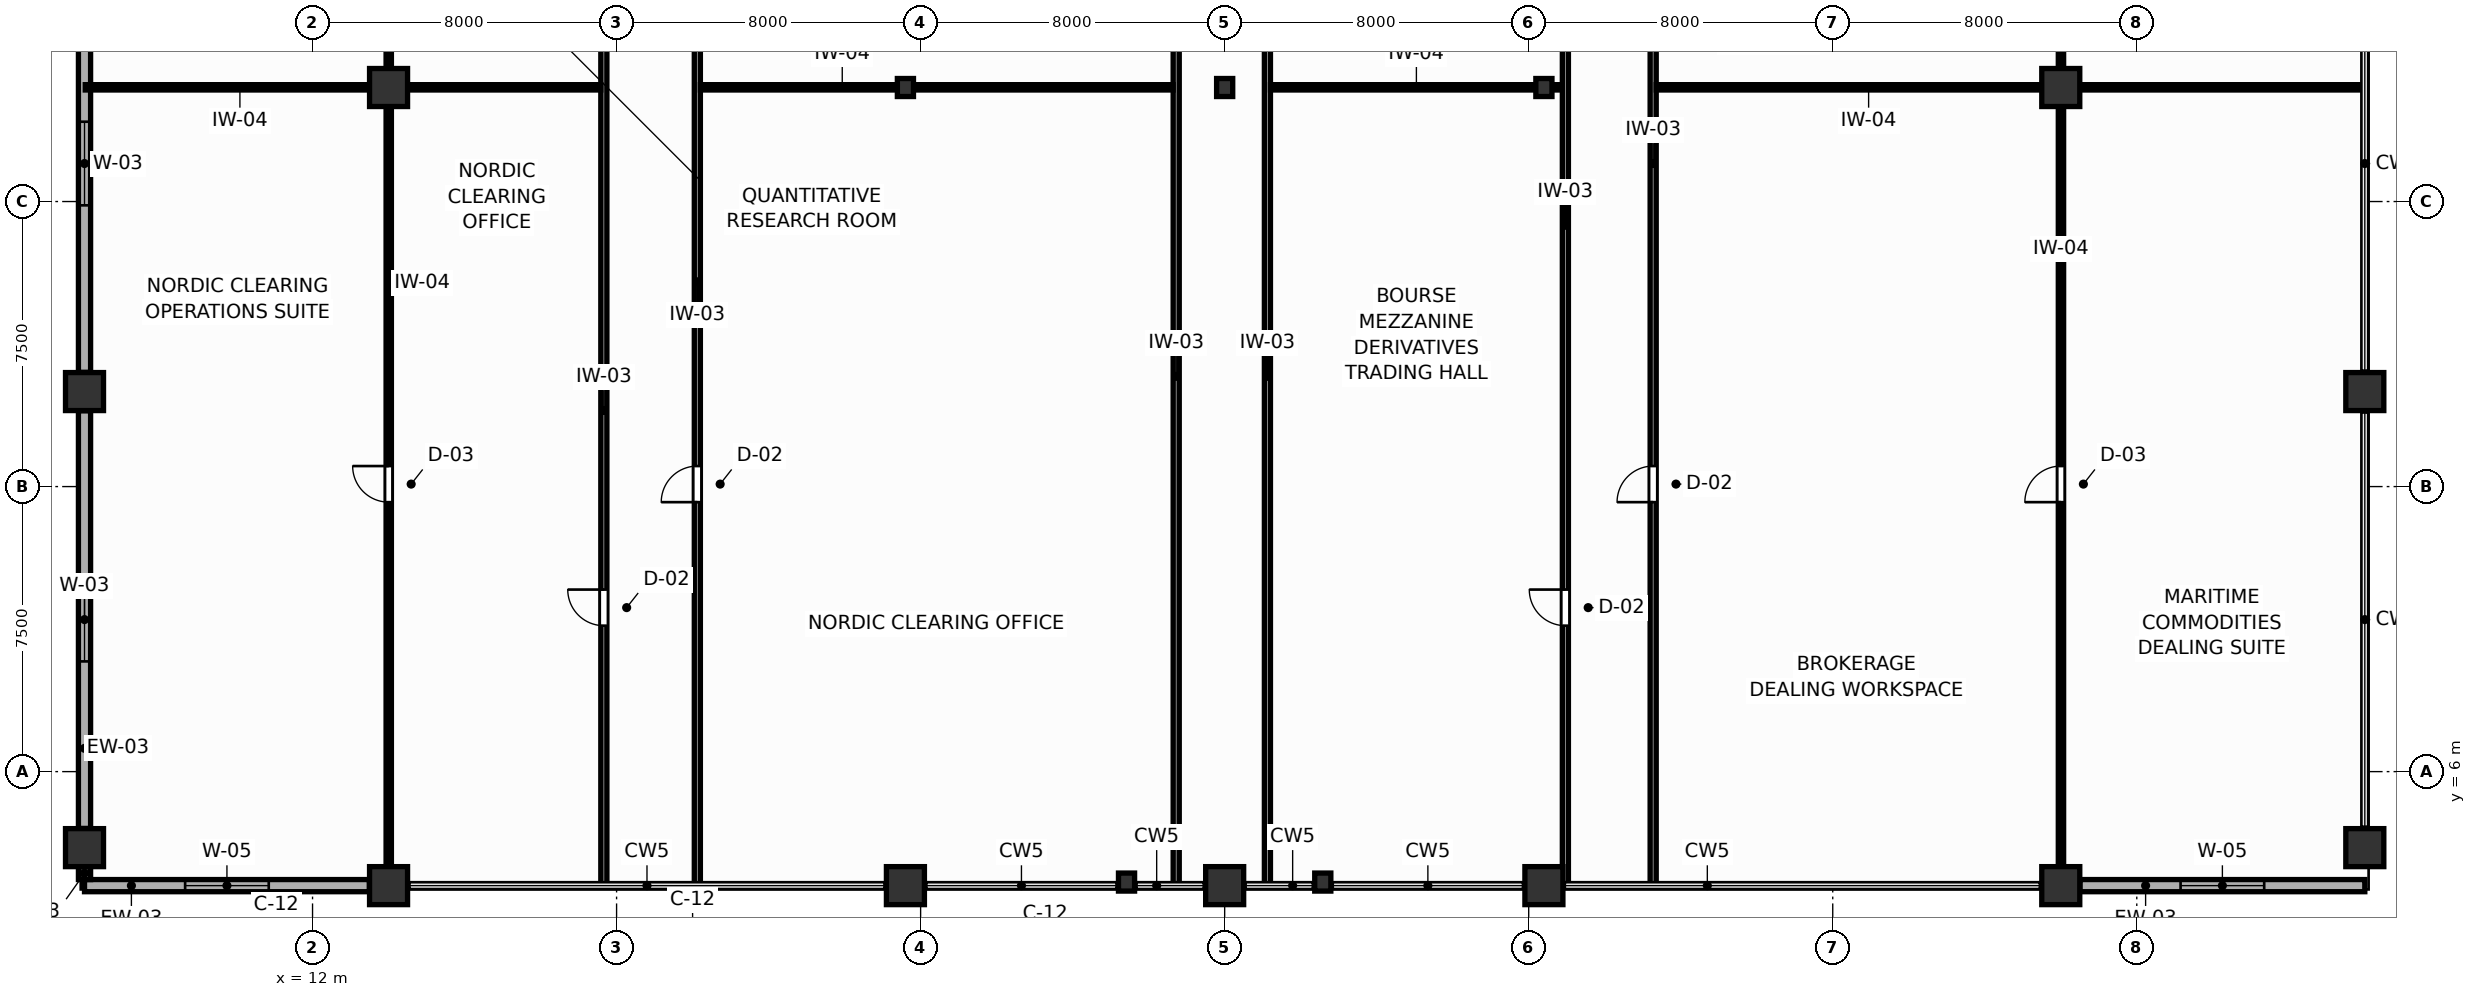
"""IFC4 building model, lengths in metres.
Left out: names, types, materials, properties, quantities, classifications, styles, units other than length and angle.
Written with IfcOpenShell. Run it as: python <this file> out.ifc"""

import sys

from ifc_helpers import new_model, si_unit, direction, frame, frame_2d, origin, origin_2d, place, context, subcontext, project, spatial, rectangle, i_section, extrude, source, transform, mapped, element, fill, save


model = new_model("IFC4")
c1 = context("Model", 3, precision=1e-05, world=origin(), true_north=direction((0.0, 1.0)))
c2 = subcontext(c1, "Body", "Model", "MODEL_VIEW")
j1 = project(units=[si_unit("LENGTHUNIT", "METRE"), si_unit("PLANEANGLEUNIT", "RADIAN")], contexts=[c1])
p1 = place(None, origin())
s1 = spatial("IfcSite", under=j1, at=p1, CompositionType="ELEMENT")
p2 = place(p1, origin())
s2 = spatial("IfcBuilding", under=s1, at=p2, CompositionType="ELEMENT")
p3 = place(p2, frame((0.0, 0.0, 9.6)))
s3 = spatial("IfcBuildingStorey", under=s2, at=p3, CompositionType="ELEMENT", Elevation=9.6)
m1 = source(origin(), c2, "Body", "SweptSolid", [
    extrude(i_section(OverallWidth=0.424, OverallDepth=0.474, WebThickness=0.045, FlangeThickness=0.072, FilletRadius=0.015, at=origin_2d()), origin(), (0.0, 0.0, 1.0), 4.8),
])
for number, where, z_axis, x_axis in (
    (1, (27.6, 24.0, 0.0), (0.0, 0.0, 1.0), (1.0, 0.0, 0.0)),
    (2, (44.4, 24.0, 0.0), (0.0, 0.0, 1.0), (1.0, 0.0, 0.0)),
    (3, (36.0, 24.0, 0.0), (0.0, 0.0, 1.0), (1.0, 0.0, 0.0)),
):
    element("IfcColumn", number, at=place(p3, frame(where, z_axis=z_axis, x_axis=x_axis)), inside=s3, PredefinedType="COLUMN", context=c2, shape_type="MappedRepresentation", body=[
        mapped(m1, transform((0.0, 0.0, 0.0), scale=1.0)),
    ])
m2 = source(origin(), c2, "Body", "SweptSolid", [
    extrude(rectangle(XDim=1.0, YDim=1.0, at=origin_2d()), origin(), (0.0, 0.0, 1.0), 4.8),
])
for number, where, z_axis, x_axis in (
    (4, (6.0, 4.0, 0.0), (0.0, 0.0, 1.0), (1.0, 0.0, 0.0)),
    (5, (6.0, 16.0, 0.0), (0.0, 0.0, 1.0), (1.0, 0.0, 0.0)),
    (6, (66.0, 4.0, 0.0), (0.0, 0.0, 1.0), (1.0, 0.0, 0.0)),
    (7, (66.0, 16.0, 0.0), (0.0, 0.0, 1.0), (1.0, 0.0, 0.0)),
    (8, (14.0, 3.0, 0.0), (0.0, 0.0, 1.0), (1.0, 0.0, 0.0)),
    (9, (27.6, 3.0, 0.0), (0.0, 0.0, 1.0), (1.0, 0.0, 0.0)),
    (10, (36.0, 3.0, 0.0), (0.0, 0.0, 1.0), (1.0, 0.0, 0.0)),
    (11, (44.4, 3.0, 0.0), (0.0, 0.0, 1.0), (1.0, 0.0, 0.0)),
    (12, (58.0, 3.0, 0.0), (0.0, 0.0, 1.0), (1.0, 0.0, 0.0)),
    (13, (14.0, 24.0, 0.0), (0.0, 0.0, 1.0), (1.0, 0.0, 0.0)),
    (14, (58.0, 24.0, 0.0), (0.0, 0.0, 1.0), (1.0, 0.0, 0.0)),
):
    element("IfcColumn", number, at=place(p3, frame(where, z_axis=z_axis, x_axis=x_axis)), inside=s3, PredefinedType="COLUMN", context=c2, shape_type="MappedRepresentation", body=[
        mapped(m2, transform((0.0, 0.0, 0.0), scale=1.0)),
    ])
for number, where, z_axis, x_axis in (
    (15, (33.418, 3.094, 0.0), (0.0, 0.0, 1.0), (1.0, 0.0, 0.0)),
    (16, (38.582, 3.094, 0.0), (0.0, 0.0, 1.0), (1.0, 0.0, 0.0)),
):
    element("IfcColumn", number, at=place(p3, frame(where, z_axis=z_axis, x_axis=x_axis)), inside=s3, PredefinedType="COLUMN", context=c2, shape_type="MappedRepresentation", body=[
        mapped(m1, transform((0.0, 0.0, 0.0), scale=1.0)),
    ])
p4 = place(p3, frame((6.0, 3.0, 0.0), z_axis=(0.0, 0.0, 1.0), x_axis=(1.0, 0.0, 0.0)))
e17 = element("IfcWall", 17, at=p4, inside=s3, PredefinedType="SOLIDWALL", context=c2, shape_type="SweptSolid", body=[
    extrude(rectangle(XDim=7.495, YDim=0.32, at=frame_2d((3.748, 0.0))), origin(), (0.0, 0.0, 1.0), 2.35),
])
p5 = place(p4, frame((2.647, 0.0, 0.75)))
e18 = element("IfcOpeningElement", 18, at=p5, cuts=e17, PredefinedType="OPENING", context=c2, shape_type="SweptSolid", body=[
    extrude(rectangle(XDim=2.2, YDim=1.4, at=frame_2d((1.1, 0.7))), frame((0.0, 0.17, 0.0), z_axis=(0.0, -1.0, 0.0), x_axis=(1.0, 0.0, 0.0)), (0.0, 0.0, 1.0), 0.34),
])
p6 = place(p3, frame((58.505, 3.0, 0.0), z_axis=(0.0, 0.0, 1.0), x_axis=(1.0, 0.0, 0.0)))
e19 = element("IfcWall", 19, at=p6, inside=s3, PredefinedType="SOLIDWALL", context=c2, shape_type="SweptSolid", body=[
    extrude(rectangle(XDim=7.495, YDim=0.32, at=frame_2d((3.748, 0.0))), origin(), (0.0, 0.0, 1.0), 2.35),
])
p7 = place(p6, frame((2.647, 0.0, 0.75)))
e20 = element("IfcOpeningElement", 20, at=p7, cuts=e19, PredefinedType="OPENING", context=c2, shape_type="SweptSolid", body=[
    extrude(rectangle(XDim=2.2, YDim=1.4, at=frame_2d((1.1, 0.7))), frame((0.0, 0.17, 0.0), z_axis=(0.0, -1.0, 0.0), x_axis=(1.0, 0.0, 0.0)), (0.0, 0.0, 1.0), 0.34),
])
p8 = place(p3, frame((6.0, 3.16, 0.0), z_axis=(0.0, 0.0, 1.0), x_axis=(0.0, 1.0, 0.0)))
e21 = element("IfcWall", 21, at=p8, inside=s3, PredefinedType="SOLIDWALL", context=c2, shape_type="SweptSolid", body=[
    extrude(rectangle(XDim=0.335, YDim=0.32, at=frame_2d((0.167, 0.0))), origin(), (0.0, 0.0, 1.0), 2.35),
])
p9 = place(p3, frame((6.0, 4.505, 0.0), z_axis=(0.0, 0.0, 1.0), x_axis=(0.0, 1.0, 0.0)))
e22 = element("IfcWall", 22, at=p9, inside=s3, PredefinedType="SOLIDWALL", context=c2, shape_type="SweptSolid", body=[
    extrude(rectangle(XDim=10.99, YDim=0.32, at=frame_2d((5.495, 0.0))), origin(), (0.0, 0.0, 1.0), 4.35),
])
p10 = place(p9, frame((4.395, 0.0, 0.75)))
e23 = element("IfcOpeningElement", 23, at=p10, cuts=e22, PredefinedType="OPENING", context=c2, shape_type="SweptSolid", body=[
    extrude(rectangle(XDim=2.2, YDim=2.0, at=frame_2d((1.1, 1.0))), frame((0.0, 0.17, 0.0), z_axis=(0.0, -1.0, 0.0), x_axis=(1.0, 0.0, 0.0)), (0.0, 0.0, 1.0), 0.34),
])
p11 = place(p3, frame((6.0, 16.505, 0.0), z_axis=(0.0, 0.0, 1.0), x_axis=(0.0, 1.0, 0.0)))
e24 = element("IfcWall", 24, at=p11, inside=s3, PredefinedType="SOLIDWALL", context=c2, shape_type="SweptSolid", body=[
    extrude(rectangle(XDim=10.99, YDim=0.32, at=frame_2d((5.495, 0.0))), origin(), (0.0, 0.0, 1.0), 4.35),
])
p12 = place(p11, frame((4.395, 0.0, 0.75)))
e25 = element("IfcOpeningElement", 25, at=p12, cuts=e24, PredefinedType="OPENING", context=c2, shape_type="SweptSolid", body=[
    extrude(rectangle(XDim=2.2, YDim=2.0, at=frame_2d((1.1, 1.0))), frame((0.0, 0.17, 0.0), z_axis=(0.0, -1.0, 0.0), x_axis=(1.0, 0.0, 0.0)), (0.0, 0.0, 1.0), 0.34),
])
p13 = place(p3, frame((47.275, 3.02, 0.0), z_axis=(0.0, 0.0, 1.0), x_axis=(0.0, 1.0, 0.0)))
e26 = element("IfcWall", 26, at=p13, inside=s3, PredefinedType="PARTITIONING", context=c2, shape_type="SweptSolid", body=[
    extrude(rectangle(XDim=26.76, YDim=0.16, at=frame_2d((13.38, 0.0))), origin(), (0.0, 0.0, 1.0), 4.35),
])
p14 = place(p13, frame((10.07, 0.0, 0.0)))
e27 = element("IfcOpeningElement", 27, at=p14, cuts=e26, PredefinedType="OPENING", context=c2, shape_type="SweptSolid", body=[
    extrude(rectangle(XDim=0.95, YDim=2.05, at=frame_2d((0.475, 1.025))), frame((0.0, 0.09, 0.0), z_axis=(0.0, -1.0, 0.0), x_axis=(1.0, 0.0, 0.0)), (0.0, 0.0, 1.0), 0.18),
])
p15 = place(p3, frame((44.965, 3.02, 0.0), z_axis=(0.0, 0.0, 1.0), x_axis=(0.0, 1.0, 0.0)))
e28 = element("IfcWall", 28, at=p15, inside=s3, PredefinedType="PARTITIONING", context=c2, shape_type="SweptSolid", body=[
    extrude(rectangle(XDim=26.76, YDim=0.16, at=frame_2d((13.38, 0.0))), origin(), (0.0, 0.0, 1.0), 2.35),
])
p16 = place(p15, frame((6.82, 0.0, 0.0)))
e29 = element("IfcOpeningElement", 29, at=p16, cuts=e28, PredefinedType="OPENING", context=c2, shape_type="SweptSolid", body=[
    extrude(rectangle(XDim=0.95, YDim=2.05, at=frame_2d((0.475, 1.025))), frame((0.0, 0.09, 0.0), z_axis=(0.0, -1.0, 0.0), x_axis=(1.0, 0.0, 0.0)), (0.0, 0.0, 1.0), 0.18),
])
p17 = place(p3, frame((37.125, 3.02, 0.0), z_axis=(0.0, 0.0, 1.0), x_axis=(0.0, 1.0, 0.0)))
e30 = element("IfcWall", 30, at=p17, inside=s3, PredefinedType="PARTITIONING", context=c2, shape_type="SweptSolid", body=[
    extrude(rectangle(XDim=26.76, YDim=0.16, at=frame_2d((13.38, 0.0))), origin(), (0.0, 0.0, 1.0), 4.35),
])
p18 = place(p3, frame((22.125, 3.02, 0.0), z_axis=(0.0, 0.0, 1.0), x_axis=(0.0, 1.0, 0.0)))
e31 = element("IfcWall", 31, at=p18, inside=s3, PredefinedType="PARTITIONING", context=c2, shape_type="SweptSolid", body=[
    extrude(rectangle(XDim=26.76, YDim=0.16, at=frame_2d((13.38, 0.0))), origin(), (0.0, 0.0, 1.0), 4.35),
])
p19 = place(p18, frame((10.07, 0.0, 0.0)))
e32 = element("IfcOpeningElement", 32, at=p19, cuts=e31, PredefinedType="OPENING", context=c2, shape_type="SweptSolid", body=[
    extrude(rectangle(XDim=0.95, YDim=2.05, at=frame_2d((0.475, 1.025))), frame((0.0, 0.09, 0.0), z_axis=(0.0, -1.0, 0.0), x_axis=(1.0, 0.0, 0.0)), (0.0, 0.0, 1.0), 0.18),
])
p20 = place(p3, frame((34.725, 3.02, 0.0), z_axis=(0.0, 0.0, 1.0), x_axis=(0.0, 1.0, 0.0)))
e33 = element("IfcWall", 33, at=p20, inside=s3, PredefinedType="PARTITIONING", context=c2, shape_type="SweptSolid", body=[
    extrude(rectangle(XDim=26.76, YDim=0.16, at=frame_2d((13.38, 0.0))), origin(), (0.0, 0.0, 1.0), 4.35),
])
p21 = place(p3, frame((19.665, 3.02, 0.0), z_axis=(0.0, 0.0, 1.0), x_axis=(0.0, 1.0, 0.0)))
e34 = element("IfcWall", 34, at=p21, inside=s3, PredefinedType="PARTITIONING", context=c2, shape_type="SweptSolid", body=[
    extrude(rectangle(XDim=26.76, YDim=0.16, at=frame_2d((13.38, 0.0))), origin(), (0.0, 0.0, 1.0), 4.35),
])
p22 = place(p21, frame((6.82, 0.0, 0.0)))
e35 = element("IfcOpeningElement", 35, at=p22, cuts=e34, PredefinedType="OPENING", context=c2, shape_type="SweptSolid", body=[
    extrude(rectangle(XDim=0.95, YDim=2.05, at=frame_2d((0.475, 1.025))), frame((0.0, 0.09, 0.0), z_axis=(0.0, -1.0, 0.0), x_axis=(1.0, 0.0, 0.0)), (0.0, 0.0, 1.0), 0.18),
])
p23 = place(p21, frame((23.238, 0.0, 0.0)))
e36 = element("IfcOpeningElement", 36, at=p23, cuts=e34, PredefinedType="OPENING", context=c2, shape_type="SweptSolid", body=[
    extrude(rectangle(XDim=0.95, YDim=2.05, at=frame_2d((0.475, 1.025))), frame((0.0, 0.09, 0.0), z_axis=(0.0, -1.0, 0.0), x_axis=(1.0, 0.0, 0.0)), (0.0, 0.0, 1.0), 0.18),
])
p24 = place(p3, frame((58.005, 3.02, 0.0), z_axis=(0.0, 0.0, 1.0), x_axis=(0.0, 1.0, 0.0)))
e37 = element("IfcWall", 37, at=p24, inside=s3, PredefinedType="PARTITIONING", context=c2, shape_type="SweptSolid", body=[
    extrude(rectangle(XDim=26.673, YDim=0.14, at=frame_2d((13.336, 0.0))), origin(), (0.0, 0.0, 1.0), 4.35),
])
p25 = place(p24, frame((10.07, 0.0, 0.0)))
e38 = element("IfcOpeningElement", 38, at=p25, cuts=e37, PredefinedType="OPENING", context=c2, shape_type="SweptSolid", body=[
    extrude(rectangle(XDim=0.95, YDim=2.05, at=frame_2d((0.475, 1.025))), frame((0.0, 0.08, 0.0), z_axis=(0.0, -1.0, 0.0), x_axis=(1.0, 0.0, 0.0)), (0.0, 0.0, 1.0), 0.16),
])
p26 = place(p3, frame((14.005, 3.02, 0.0), z_axis=(0.0, 0.0, 1.0), x_axis=(0.0, 1.0, 0.0)))
e39 = element("IfcWall", 39, at=p26, inside=s3, PredefinedType="PARTITIONING", context=c2, shape_type="SweptSolid", body=[
    extrude(rectangle(XDim=26.673, YDim=0.14, at=frame_2d((13.336, 0.0))), origin(), (0.0, 0.0, 1.0), 4.35),
])
p27 = place(p26, frame((10.07, 0.0, 0.0)))
e40 = element("IfcOpeningElement", 40, at=p27, cuts=e39, PredefinedType="OPENING", context=c2, shape_type="SweptSolid", body=[
    extrude(rectangle(XDim=0.95, YDim=2.05, at=frame_2d((0.475, 1.025))), frame((0.0, 0.08, 0.0), z_axis=(0.0, -1.0, 0.0), x_axis=(1.0, 0.0, 0.0)), (0.0, 0.0, 1.0), 0.16),
])
p28 = place(p3, frame((47.357, 24.005, 0.0), z_axis=(0.0, 0.0, 1.0), x_axis=(1.0, 0.0, 0.0)))
e41 = element("IfcWall", 41, at=p28, inside=s3, PredefinedType="PARTITIONING", context=c2, shape_type="SweptSolid", body=[
    extrude(rectangle(XDim=18.623, YDim=0.14, at=frame_2d((9.312, 0.0))), origin(), (0.0, 0.0, 1.0), 2.35),
])
p29 = place(p3, frame((6.02, 24.005, 0.0), z_axis=(0.0, 0.0, 1.0), x_axis=(1.0, 0.0, 0.0)))
e42 = element("IfcWall", 42, at=p29, inside=s3, PredefinedType="PARTITIONING", context=c2, shape_type="SweptSolid", body=[
    extrude(rectangle(XDim=13.563, YDim=0.14, at=frame_2d((6.781, 0.0))), origin(), (0.0, 0.0, 1.0), 2.35),
])
p30 = place(p3, frame((22.207, 24.005, 0.0), z_axis=(0.0, 0.0, 1.0), x_axis=(1.0, 0.0, 0.0)))
e43 = element("IfcWall", 43, at=p30, inside=s3, PredefinedType="PARTITIONING", context=c2, shape_type="SweptSolid", body=[
    extrude(rectangle(XDim=12.436, YDim=0.14, at=frame_2d((6.218, 0.0))), origin(), (0.0, 0.0, 1.0), 2.35),
])
p31 = place(p3, frame((37.207, 24.005, 0.0), z_axis=(0.0, 0.0, 1.0), x_axis=(1.0, 0.0, 0.0)))
e44 = element("IfcWall", 44, at=p31, inside=s3, PredefinedType="PARTITIONING", context=c2, shape_type="SweptSolid", body=[
    extrude(rectangle(XDim=7.676, YDim=0.14, at=frame_2d((3.838, 0.0))), origin(), (0.0, 0.0, 1.0), 2.35),
])
p32 = place(p5, origin())
e45 = element("IfcWindow", 45, at=p32, inside=s3, PartitioningType="SINGLE_PANEL", PredefinedType="WINDOW", context=c2, shape_type="SweptSolid", body=[
    extrude(rectangle(XDim=2.2, YDim=1.4, at=frame_2d((1.1, 0.7))), frame((0.0, 0.03, 0.0), z_axis=(0.0, -1.0, 0.0), x_axis=(1.0, 0.0, 0.0)), (0.0, 0.0, 1.0), 0.06),
])
fill(e18, e45)
p33 = place(p7, origin())
e46 = element("IfcWindow", 46, at=p33, inside=s3, PartitioningType="SINGLE_PANEL", PredefinedType="WINDOW", context=c2, shape_type="SweptSolid", body=[
    extrude(rectangle(XDim=2.2, YDim=1.4, at=frame_2d((1.1, 0.7))), frame((0.0, 0.03, 0.0), z_axis=(0.0, -1.0, 0.0), x_axis=(1.0, 0.0, 0.0)), (0.0, 0.0, 1.0), 0.06),
])
fill(e20, e46)
p34 = place(p10, origin())
e47 = element("IfcWindow", 47, at=p34, inside=s3, PartitioningType="SINGLE_PANEL", PredefinedType="WINDOW", context=c2, shape_type="SweptSolid", body=[
    extrude(rectangle(XDim=2.2, YDim=2.0, at=frame_2d((1.1, 1.0))), frame((0.0, 0.03, 0.0), z_axis=(0.0, -1.0, 0.0), x_axis=(1.0, 0.0, 0.0)), (0.0, 0.0, 1.0), 0.06),
])
fill(e23, e47)
p35 = place(p12, origin())
e48 = element("IfcWindow", 48, at=p35, inside=s3, PartitioningType="SINGLE_PANEL", PredefinedType="WINDOW", context=c2, shape_type="SweptSolid", body=[
    extrude(rectangle(XDim=2.2, YDim=2.0, at=frame_2d((1.1, 1.0))), frame((0.0, 0.03, 0.0), z_axis=(0.0, -1.0, 0.0), x_axis=(1.0, 0.0, 0.0)), (0.0, 0.0, 1.0), 0.06),
])
fill(e25, e48)
p36 = place(p14, origin())
e49 = element("IfcDoor", 49, at=p36, inside=s3, OperationType="SINGLE_SWING_LEFT", PredefinedType="DOOR", context=c2, shape_type="SweptSolid", body=[
    extrude(rectangle(XDim=0.95, YDim=2.05, at=frame_2d((0.475, 1.025))), frame((0.0, 0.025, 0.0), z_axis=(0.0, -1.0, 0.0), x_axis=(1.0, 0.0, 0.0)), (0.0, 0.0, 1.0), 0.05),
])
fill(e27, e49)
p37 = place(p16, origin())
e50 = element("IfcDoor", 50, at=p37, inside=s3, OperationType="SINGLE_SWING_RIGHT", PredefinedType="DOOR", context=c2, shape_type="SweptSolid", body=[
    extrude(rectangle(XDim=0.95, YDim=2.05, at=frame_2d((0.475, 1.025))), frame((0.0, 0.025, 0.0), z_axis=(0.0, -1.0, 0.0), x_axis=(1.0, 0.0, 0.0)), (0.0, 0.0, 1.0), 0.05),
])
fill(e29, e50)
p38 = place(p19, origin())
e51 = element("IfcDoor", 51, at=p38, inside=s3, OperationType="SINGLE_SWING_LEFT", PredefinedType="DOOR", context=c2, shape_type="SweptSolid", body=[
    extrude(rectangle(XDim=0.95, YDim=2.05, at=frame_2d((0.475, 1.025))), frame((0.0, 0.025, 0.0), z_axis=(0.0, -1.0, 0.0), x_axis=(1.0, 0.0, 0.0)), (0.0, 0.0, 1.0), 0.05),
])
fill(e32, e51)
p39 = place(p22, origin())
e52 = element("IfcDoor", 52, at=p39, inside=s3, OperationType="SINGLE_SWING_RIGHT", PredefinedType="DOOR", context=c2, shape_type="SweptSolid", body=[
    extrude(rectangle(XDim=0.95, YDim=2.05, at=frame_2d((0.475, 1.025))), frame((0.0, 0.025, 0.0), z_axis=(0.0, -1.0, 0.0), x_axis=(1.0, 0.0, 0.0)), (0.0, 0.0, 1.0), 0.05),
])
fill(e35, e52)
p40 = place(p25, origin())
e53 = element("IfcDoor", 53, at=p40, inside=s3, OperationType="SINGLE_SWING_LEFT", PredefinedType="DOOR", context=c2, shape_type="SweptSolid", body=[
    extrude(rectangle(XDim=0.95, YDim=2.05, at=frame_2d((0.475, 1.025))), frame((0.0, 0.025, 0.0), z_axis=(0.0, -1.0, 0.0), x_axis=(1.0, 0.0, 0.0)), (0.0, 0.0, 1.0), 0.05),
])
fill(e38, e53)
p41 = place(p27, origin())
e54 = element("IfcDoor", 54, at=p41, inside=s3, OperationType="SINGLE_SWING_RIGHT", PredefinedType="DOOR", context=c2, shape_type="SweptSolid", body=[
    extrude(rectangle(XDim=0.95, YDim=2.05, at=frame_2d((0.475, 1.025))), frame((0.0, 0.025, 0.0), z_axis=(0.0, -1.0, 0.0), x_axis=(1.0, 0.0, 0.0)), (0.0, 0.0, 1.0), 0.05),
])
fill(e40, e54)
save(model, sys.argv[1])
